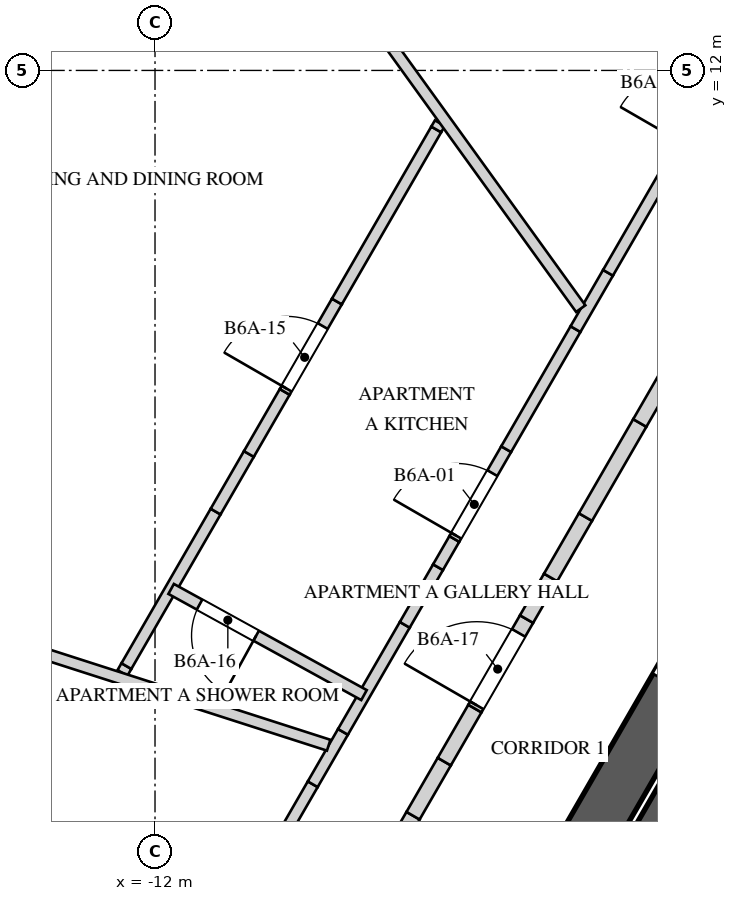
"""IFC4 building model, lengths in metres.
Left out: names, types, materials, properties, quantities, classifications, styles, units other than length and angle.
Written with IfcOpenShell. Run it as: python <this file> out.ifc"""

import sys

from ifc_helpers import new_model, si_unit, direction, frame, frame_2d, origin, place, context, subcontext, project, spatial, polyline, rectangle, outline, extrude, element, fill, save


model = new_model("IFC4")
c1 = context("Model", 3, precision=1e-05, world=origin(), true_north=direction((0.0, 1.0)))
c2 = subcontext(c1, "Body", "Model", "MODEL_VIEW")
j1 = project(units=[si_unit("LENGTHUNIT", "METRE"), si_unit("PLANEANGLEUNIT", "RADIAN")], contexts=[c1])
p1 = place(None, origin())
s1 = spatial("IfcSite", under=j1, at=p1, CompositionType="ELEMENT")
p2 = place(p1, origin())
s2 = spatial("IfcBuilding", under=s1, at=p2, CompositionType="ELEMENT")
p3 = place(p2, frame((0.0, 0.0, 241.2)))
s3 = spatial("IfcBuildingStorey", under=s2, at=p3, CompositionType="ELEMENT", Elevation=241.2)
p4 = place(p3, frame((-1.241, 10.65, 0.0), z_axis=(0.0, 0.0, 1.0), x_axis=(-0.500003331888, -0.866023480109, 0.0)))
e1 = element("IfcWall", 1, at=p4, inside=s3, PredefinedType="SHEAR", context=c2, shape_type="SweptSolid", body=[
    extrude(rectangle(XDim=17.205, YDim=0.7, at=frame_2d((8.603, 0.0))), origin(), (0.0, 0.0, 1.0), 4.0),
])
p5 = place(p4, frame((6.808, 0.0, 0.0)))
e2 = element("IfcOpeningElement", 2, at=p5, cuts=e1, PredefinedType="OPENING", context=c2, shape_type="SweptSolid", body=[
    extrude(rectangle(XDim=1.0, YDim=2.4, at=frame_2d((0.5, 1.2))), frame((0.0, 0.36, 0.0), z_axis=(0.0, -1.0, 0.0), x_axis=(1.0, 0.0, 0.0)), (0.0, 0.0, 1.0), 0.72),
])
p6 = place(p4, frame((14.922, 0.0, 0.0)))
e3 = element("IfcOpeningElement", 3, at=p6, cuts=e1, PredefinedType="OPENING", context=c2, shape_type="SweptSolid", body=[
    extrude(rectangle(XDim=0.8, YDim=2.1, at=frame_2d((0.4, 1.05))), frame((0.0, 0.36, 0.0), z_axis=(0.0, -1.0, 0.0), x_axis=(1.0, 0.0, 0.0)), (0.0, 0.0, 1.0), 0.72),
])
p7 = place(p3, frame((-4.538, 3.44, 0.0), z_axis=(0.0, 0.0, 1.0), x_axis=(-0.499996545922, -0.866027397988, 0.0)))
e4 = element("IfcWall", 4, at=p7, inside=s3, PredefinedType="SOLIDWALL", context=c2, shape_type="SweptSolid", body=[
    extrude(rectangle(XDim=5.5, YDim=0.6, at=frame_2d((2.75, 0.0))), origin(), (0.0, 0.0, 1.0), 3.65),
])
p8 = place(p3, frame((-12.213, -1.354, 0.0), z_axis=(0.0, 0.0, 1.0), x_axis=(0.500001111708, 0.866024761939, 0.0)))
e5 = element("IfcWall", 5, at=p8, inside=s3, PredefinedType="PARTITIONING", context=c2, shape_type="SweptSolid", body=[
    extrude(rectangle(XDim=4.576, YDim=0.15, at=frame_2d((2.288, 0.0))), origin(), (0.0, 0.0, 1.0), 3.65),
])
p9 = place(p8, frame((0.445, 0.0, 0.0)))
e6 = element("IfcOpeningElement", 6, at=p9, cuts=e5, PredefinedType="OPENING", context=c2, shape_type="SweptSolid", body=[
    extrude(rectangle(XDim=0.95, YDim=2.4, at=frame_2d((0.475, 1.2))), frame((0.0, 0.085, 0.0), z_axis=(0.0, -1.0, 0.0), x_axis=(1.0, 0.0, 0.0)), (0.0, 0.0, 1.0), 0.17),
])
p10 = place(p3, frame((-9.925, 2.609, 0.0), z_axis=(0.0, 0.0, 1.0), x_axis=(0.499802134818, 0.866139611167, 0.0)))
e7 = element("IfcWall", 7, at=p10, inside=s3, PredefinedType="PARTITIONING", context=c2, shape_type="SweptSolid", body=[
    extrude(rectangle(XDim=0.796, YDim=0.15, at=frame_2d((0.398, 0.0))), origin(), (0.0, 0.0, 1.0), 2.75),
])
p11 = place(p3, frame((-9.527, 3.298, 0.0), z_axis=(0.0, 0.0, 1.0), x_axis=(0.500094991843, 0.865970553272, 0.0)))
e8 = element("IfcWall", 8, at=p11, inside=s3, PredefinedType="PARTITIONING", context=c2, shape_type="SweptSolid", body=[
    extrude(rectangle(XDim=1.626, YDim=0.15, at=frame_2d((0.813, 0.0))), origin(), (0.0, 0.0, 1.0), 3.65),
])
p12 = place(p3, frame((-8.714, 4.707, 0.0), z_axis=(0.0, 0.0, 1.0), x_axis=(0.499859285417, 0.866106630146, 0.0)))
e9 = element("IfcWall", 9, at=p12, inside=s3, PredefinedType="PARTITIONING", context=c2, shape_type="SweptSolid", body=[
    extrude(rectangle(XDim=0.875, YDim=0.15, at=frame_2d((0.438, 0.0))), origin(), (0.0, 0.0, 1.0), 2.55),
])
p13 = place(p3, frame((-8.277, 5.465, 0.0), z_axis=(0.0, 0.0, 1.0), x_axis=(0.500116443366, 0.865958164737, 0.0)))
e10 = element("IfcWall", 10, at=p13, inside=s3, PredefinedType="PARTITIONING", context=c2, shape_type="SweptSolid", body=[
    extrude(rectangle(XDim=0.429, YDim=0.15, at=frame_2d((0.215, 0.0))), origin(), (0.0, 0.0, 1.0), 3.65),
])
p14 = place(p3, frame((-8.062, 5.836, 0.0), z_axis=(0.0, 0.0, 1.0), x_axis=(0.499970382458, 0.866042502805, 0.0)))
e11 = element("IfcWall", 11, at=p14, inside=s3, PredefinedType="PARTITIONING", context=c2, shape_type="SweptSolid", body=[
    extrude(outline(polyline([(0.0, 0.0), (1.364, 0.0), (1.364, 2.55), (0.472, 2.55), (0.472, 3.65), (0.0, 3.65), (0.0, 0.0)])), frame((0.0, 0.075, 0.0), z_axis=(0.0, -1.0, 0.0), x_axis=(1.0, 0.0, 0.0)), (0.0, 0.0, 1.0), 0.15),
])
p15 = place(p14, frame((0.05, 0.0, 0.0)))
e12 = element("IfcOpeningElement", 12, at=p15, cuts=e11, PredefinedType="OPENING", context=c2, shape_type="SweptSolid", body=[
    extrude(rectangle(XDim=0.95, YDim=2.4, at=frame_2d((0.475, 1.2))), frame((0.0, 0.085, 0.0), z_axis=(0.0, -1.0, 0.0), x_axis=(1.0, 0.0, 0.0)), (0.0, 0.0, 1.0), 0.17),
])
p16 = place(p3, frame((-7.38, 7.017, 0.0), z_axis=(0.0, 0.0, 1.0), x_axis=(0.500012159746, 0.866018383238, 0.0)))
e13 = element("IfcWall", 13, at=p16, inside=s3, PredefinedType="PARTITIONING", context=c2, shape_type="SweptSolid", body=[
    extrude(rectangle(XDim=1.824, YDim=0.15, at=frame_2d((0.912, 0.0))), origin(), (0.0, 0.0, 1.0), 3.65),
])
p17 = place(p3, frame((-6.468, 8.597, 0.0), z_axis=(0.0, 0.0, 1.0), x_axis=(0.500035209441, 0.86600507465, 0.0)))
e14 = element("IfcWall", 14, at=p17, inside=s3, PredefinedType="PARTITIONING", context=c2, shape_type="SweptSolid", body=[
    extrude(rectangle(XDim=0.856, YDim=0.15, at=frame_2d((0.428, 0.0))), origin(), (0.0, 0.0, 1.0), 2.75),
])
p18 = place(p3, frame((-6.04, 9.338, 0.0), z_axis=(0.0, 0.0, 1.0), x_axis=(0.500014044516, 0.866017295027, 0.0)))
e15 = element("IfcWall", 15, at=p18, inside=s3, PredefinedType="PARTITIONING", context=c2, shape_type="SweptSolid", body=[
    extrude(rectangle(XDim=5.556, YDim=0.15, at=frame_2d((2.778, 0.0))), origin(), (0.0, 0.0, 1.0), 3.65),
])
p19 = place(p18, frame((1.971, 0.0, 0.0)))
e16 = element("IfcOpeningElement", 16, at=p19, cuts=e15, PredefinedType="OPENING", context=c2, shape_type="SweptSolid", body=[
    extrude(rectangle(XDim=0.95, YDim=2.4, at=frame_2d((0.475, 1.2))), frame((0.0, 0.085, 0.0), z_axis=(0.0, -1.0, 0.0), x_axis=(1.0, 0.0, 0.0)), (0.0, 0.0, 1.0), 0.17),
])
p20 = place(p3, frame((-12.428, 4.074, 0.0), z_axis=(0.0, 0.0, 1.0), x_axis=(0.500943559977, 0.865479953388, 0.0)))
e17 = element("IfcWall", 17, at=p20, inside=s3, PredefinedType="PARTITIONING", context=c2, shape_type="SweptSolid", body=[
    extrude(rectangle(XDim=0.104, YDim=0.15, at=frame_2d((0.052, 0.0))), origin(), (0.0, 0.0, 1.0), 2.75),
])
p21 = place(p3, frame((-12.376, 4.164, 0.0), z_axis=(0.0, 0.0, 1.0), x_axis=(0.499998569178, 0.866026229868, 0.0)))
e18 = element("IfcWall", 18, at=p21, inside=s3, PredefinedType="PARTITIONING", context=c2, shape_type="SweptSolid", body=[
    extrude(rectangle(XDim=2.347, YDim=0.15, at=frame_2d((1.174, 0.0))), origin(), (0.0, 0.0, 1.0), 3.65),
])
p22 = place(p3, frame((-11.203, 6.196, 0.0), z_axis=(0.0, 0.0, 1.0), x_axis=(0.499980071345, 0.866036909293, 0.0)))
e19 = element("IfcWall", 19, at=p22, inside=s3, PredefinedType="PARTITIONING", context=c2, shape_type="SweptSolid", body=[
    extrude(rectangle(XDim=0.875, YDim=0.15, at=frame_2d((0.438, 0.0))), origin(), (0.0, 0.0, 1.0), 2.55),
])
p23 = place(p3, frame((-10.765, 6.954, 0.0), z_axis=(0.0, 0.0, 1.0), x_axis=(0.499841962787, 0.866116627388, 0.0)))
e20 = element("IfcWall", 20, at=p23, inside=s3, PredefinedType="PARTITIONING", context=c2, shape_type="SweptSolid", body=[
    extrude(rectangle(XDim=0.943, YDim=0.15, at=frame_2d((0.472, 0.0))), origin(), (0.0, 0.0, 1.0), 3.65),
])
p24 = place(p3, frame((-10.294, 7.771, 0.0), z_axis=(0.0, 0.0, 1.0), x_axis=(0.500117582512, 0.865957506846, 0.0)))
e21 = element("IfcWall", 21, at=p24, inside=s3, PredefinedType="PARTITIONING", context=c2, shape_type="SweptSolid", body=[
    extrude(outline(polyline([(0.0, 0.0), (1.373, 0.0), (1.373, 2.55), (0.481, 2.55), (0.481, 3.65), (0.0, 3.65), (0.0, 0.0)])), frame((0.0, 0.075, 0.0), z_axis=(0.0, -1.0, 0.0), x_axis=(1.0, 0.0, 0.0)), (0.0, 0.0, 1.0), 0.15),
])
p25 = place(p24, frame((0.05, 0.0, 0.0)))
e22 = element("IfcOpeningElement", 22, at=p25, cuts=e21, PredefinedType="OPENING", context=c2, shape_type="SweptSolid", body=[
    extrude(rectangle(XDim=0.95, YDim=2.4, at=frame_2d((0.475, 1.2))), frame((0.0, 0.085, 0.0), z_axis=(0.0, -1.0, 0.0), x_axis=(1.0, 0.0, 0.0)), (0.0, 0.0, 1.0), 0.17),
])
p26 = place(p3, frame((-9.607, 8.96, 0.0), z_axis=(0.0, 0.0, 1.0), x_axis=(0.49994612994, 0.866056503444, 0.0)))
e23 = element("IfcWall", 23, at=p26, inside=s3, PredefinedType="PARTITIONING", context=c2, shape_type="SweptSolid", body=[
    extrude(rectangle(XDim=2.614, YDim=0.15, at=frame_2d((1.307, 0.0))), origin(), (0.0, 0.0, 1.0), 3.65),
])
p27 = place(p3, frame((-8.3, 11.224, 0.0), z_axis=(0.0, 0.0, 1.0), x_axis=(0.501641482138, 0.865075617156, 0.0)))
e24 = element("IfcWall", 24, at=p27, inside=s3, PredefinedType="PARTITIONING", context=c2, shape_type="SweptSolid", body=[
    extrude(rectangle(XDim=0.095, YDim=0.15, at=frame_2d((0.048, 0.0))), origin(), (0.0, 0.0, 1.0), 2.75),
])
p28 = place(p3, frame((-11.858, 16.429, 0.0), z_axis=(0.0, 0.0, 1.0), x_axis=(0.585232485498, -0.810865548607, 0.0)))
e25 = element("IfcWall", 25, at=p28, inside=s3, PredefinedType="PARTITIONING", context=c2, shape_type="SweptSolid", body=[
    extrude(rectangle(XDim=9.327, YDim=0.15, at=frame_2d((4.664, 0.0))), origin(), (0.0, 0.0, 1.0), 2.75),
])
p29 = place(p3, frame((-9.715, 3.123, 0.0), z_axis=(0.0, 0.0, 1.0), x_axis=(-0.952031844805, 0.305998964831, 0.0)))
e26 = element("IfcWall", 26, at=p29, inside=s3, PredefinedType="PARTITIONING", context=c2, shape_type="SweptSolid", body=[
    extrude(rectangle(XDim=10.057, YDim=0.15, at=frame_2d((5.028, 0.0))), origin(), (0.0, 0.0, 1.0), 2.75),
])
p30 = place(p3, frame((-9.25, 3.782, 0.0), z_axis=(0.0, 0.0, 1.0), x_axis=(-0.876043224435, 0.482232587991, 0.0)))
e27 = element("IfcWall", 27, at=p30, inside=s3, PredefinedType="PARTITIONING", context=c2, shape_type="SweptSolid", body=[
    extrude(rectangle(XDim=2.896, YDim=0.15, at=frame_2d((1.448, 0.0))), origin(), (0.0, 0.0, 1.0), 3.65),
])
p31 = place(p30, frame((1.62, 0.0, 0.0)))
e28 = element("IfcOpeningElement", 28, at=p31, cuts=e27, PredefinedType="OPENING", context=c2, shape_type="SweptSolid", body=[
    extrude(rectangle(XDim=0.85, YDim=2.4, at=frame_2d((0.425, 1.2))), frame((0.0, 0.085, 0.0), z_axis=(0.0, -1.0, 0.0), x_axis=(1.0, 0.0, 0.0)), (0.0, 0.0, 1.0), 0.17),
])
p32 = place(p3, frame((-10.51, -1.105, 0.0), z_axis=(0.0, 0.0, 1.0), x_axis=(0.499997905474, 0.866026613056, 0.0)))
e29 = element("IfcWall", 29, at=p32, inside=s3, PredefinedType="SOLIDWALL", context=c2, shape_type="SweptSolid", body=[
    extrude(rectangle(XDim=3.811, YDim=0.2, at=frame_2d((1.905, 0.0))), origin(), (0.0, 0.0, 1.0), 3.65),
])
p33 = place(p3, frame((-8.605, 2.195, 0.0), z_axis=(0.0, 0.0, 1.0), x_axis=(0.499911126926, 0.866076708598, 0.0)))
e30 = element("IfcWall", 30, at=p33, inside=s3, PredefinedType="SOLIDWALL", context=c2, shape_type="SweptSolid", body=[
    extrude(rectangle(XDim=0.822, YDim=0.2, at=frame_2d((0.411, 0.0))), origin(), (0.0, 0.0, 1.0), 2.75),
])
p34 = place(p3, frame((-8.195, 2.907, 0.0), z_axis=(0.0, 0.0, 1.0), x_axis=(0.500211976125, 0.865902984716, 0.0)))
e31 = element("IfcWall", 31, at=p34, inside=s3, PredefinedType="SOLIDWALL", context=c2, shape_type="SweptSolid", body=[
    extrude(rectangle(XDim=0.806, YDim=0.2, at=frame_2d((0.403, 0.0))), origin(), (0.0, 0.0, 1.0), 3.65),
])
p35 = place(p3, frame((-7.792, 3.604, 0.0), z_axis=(0.0, 0.0, 1.0), x_axis=(0.500002290144, 0.866024081565, 0.0)))
e32 = element("IfcWall", 32, at=p35, inside=s3, PredefinedType="SOLIDWALL", context=c2, shape_type="SweptSolid", body=[
    extrude(outline(polyline([(0.0, 0.0), (1.359, 0.0), (1.359, 2.55), (0.459, 2.55), (0.459, 3.65), (0.0, 3.65), (0.0, 0.0)])), frame((0.0, 0.1, 0.0), z_axis=(0.0, -1.0, 0.0), x_axis=(1.0, 0.0, 0.0)), (0.0, 0.0, 1.0), 0.2),
])
p36 = place(p35, frame((0.05, 0.0, 0.0)))
e33 = element("IfcOpeningElement", 33, at=p36, cuts=e32, PredefinedType="OPENING", context=c2, shape_type="SweptSolid", body=[
    extrude(rectangle(XDim=1.1, YDim=2.4, at=frame_2d((0.55, 1.2))), frame((0.0, 0.11, 0.0), z_axis=(0.0, -1.0, 0.0), x_axis=(1.0, 0.0, 0.0)), (0.0, 0.0, 1.0), 0.22),
])
p37 = place(p3, frame((-7.112, 4.782, 0.0), z_axis=(0.0, 0.0, 1.0), x_axis=(0.499956208541, 0.866050685319, 0.0)))
e34 = element("IfcWall", 34, at=p37, inside=s3, PredefinedType="SOLIDWALL", context=c2, shape_type="SweptSolid", body=[
    extrude(rectangle(XDim=0.633, YDim=0.2, at=frame_2d((0.316, 0.0))), origin(), (0.0, 0.0, 1.0), 3.65),
])
p38 = place(p3, frame((-6.795, 5.33, 0.0), z_axis=(0.0, 0.0, 1.0), x_axis=(0.499975954304, 0.866039286129, 0.0)))
e35 = element("IfcWall", 35, at=p38, inside=s3, PredefinedType="SOLIDWALL", context=c2, shape_type="SweptSolid", body=[
    extrude(rectangle(XDim=0.917, YDim=0.2, at=frame_2d((0.458, 0.0))), origin(), (0.0, 0.0, 1.0), 2.55),
])
p39 = place(p3, frame((-6.337, 6.124, 0.0), z_axis=(0.0, 0.0, 1.0), x_axis=(0.499904796234, 0.866080362727, 0.0)))
e36 = element("IfcWall", 36, at=p39, inside=s3, PredefinedType="SOLIDWALL", context=c2, shape_type="SweptSolid", body=[
    extrude(rectangle(XDim=1.429, YDim=0.2, at=frame_2d((0.715, 0.0))), origin(), (0.0, 0.0, 1.0), 3.65),
])
p40 = place(p3, frame((-5.622, 7.362, 0.0), z_axis=(0.0, 0.0, 1.0), x_axis=(0.500121072013, 0.86595549154, 0.0)))
e37 = element("IfcWall", 37, at=p40, inside=s3, PredefinedType="SOLIDWALL", context=c2, shape_type="SweptSolid", body=[
    extrude(rectangle(XDim=0.884, YDim=0.2, at=frame_2d((0.442, 0.0))), origin(), (0.0, 0.0, 1.0), 2.75),
])
p41 = place(p15, origin())
e38 = element("IfcDoor", 38, at=p41, inside=s3, OperationType="SINGLE_SWING_LEFT", PredefinedType="DOOR", context=c2, shape_type="SweptSolid", body=[
    extrude(rectangle(XDim=0.95, YDim=2.4, at=frame_2d((0.475, 1.2))), frame((0.0, 0.025, 0.0), z_axis=(0.0, -1.0, 0.0), x_axis=(1.0, 0.0, 0.0)), (0.0, 0.0, 1.0), 0.05),
])
fill(e12, e38)
p42 = place(p25, origin())
e39 = element("IfcDoor", 39, at=p42, inside=s3, OperationType="SINGLE_SWING_LEFT", PredefinedType="DOOR", context=c2, shape_type="SweptSolid", body=[
    extrude(rectangle(XDim=0.95, YDim=2.4, at=frame_2d((0.475, 1.2))), frame((0.0, 0.025, 0.0), z_axis=(0.0, -1.0, 0.0), x_axis=(1.0, 0.0, 0.0)), (0.0, 0.0, 1.0), 0.05),
])
fill(e22, e39)
p43 = place(p31, origin())
e40 = element("IfcDoor", 40, at=p43, inside=s3, OperationType="SINGLE_SWING_RIGHT", PredefinedType="DOOR", context=c2, shape_type="SweptSolid", body=[
    extrude(rectangle(XDim=0.85, YDim=2.4, at=frame_2d((0.425, 1.2))), frame((0.0, 0.025, 0.0), z_axis=(0.0, -1.0, 0.0), x_axis=(1.0, 0.0, 0.0)), (0.0, 0.0, 1.0), 0.05),
])
fill(e28, e40)
p44 = place(p36, origin())
e41 = element("IfcDoor", 41, at=p44, inside=s3, OperationType="SINGLE_SWING_LEFT", PredefinedType="DOOR", context=c2, shape_type="SweptSolid", body=[
    extrude(rectangle(XDim=1.1, YDim=2.4, at=frame_2d((0.55, 1.2))), frame((0.0, 0.025, 0.0), z_axis=(0.0, -1.0, 0.0), x_axis=(1.0, 0.0, 0.0)), (0.0, 0.0, 1.0), 0.05),
])
fill(e33, e41)
save(model, sys.argv[1])
